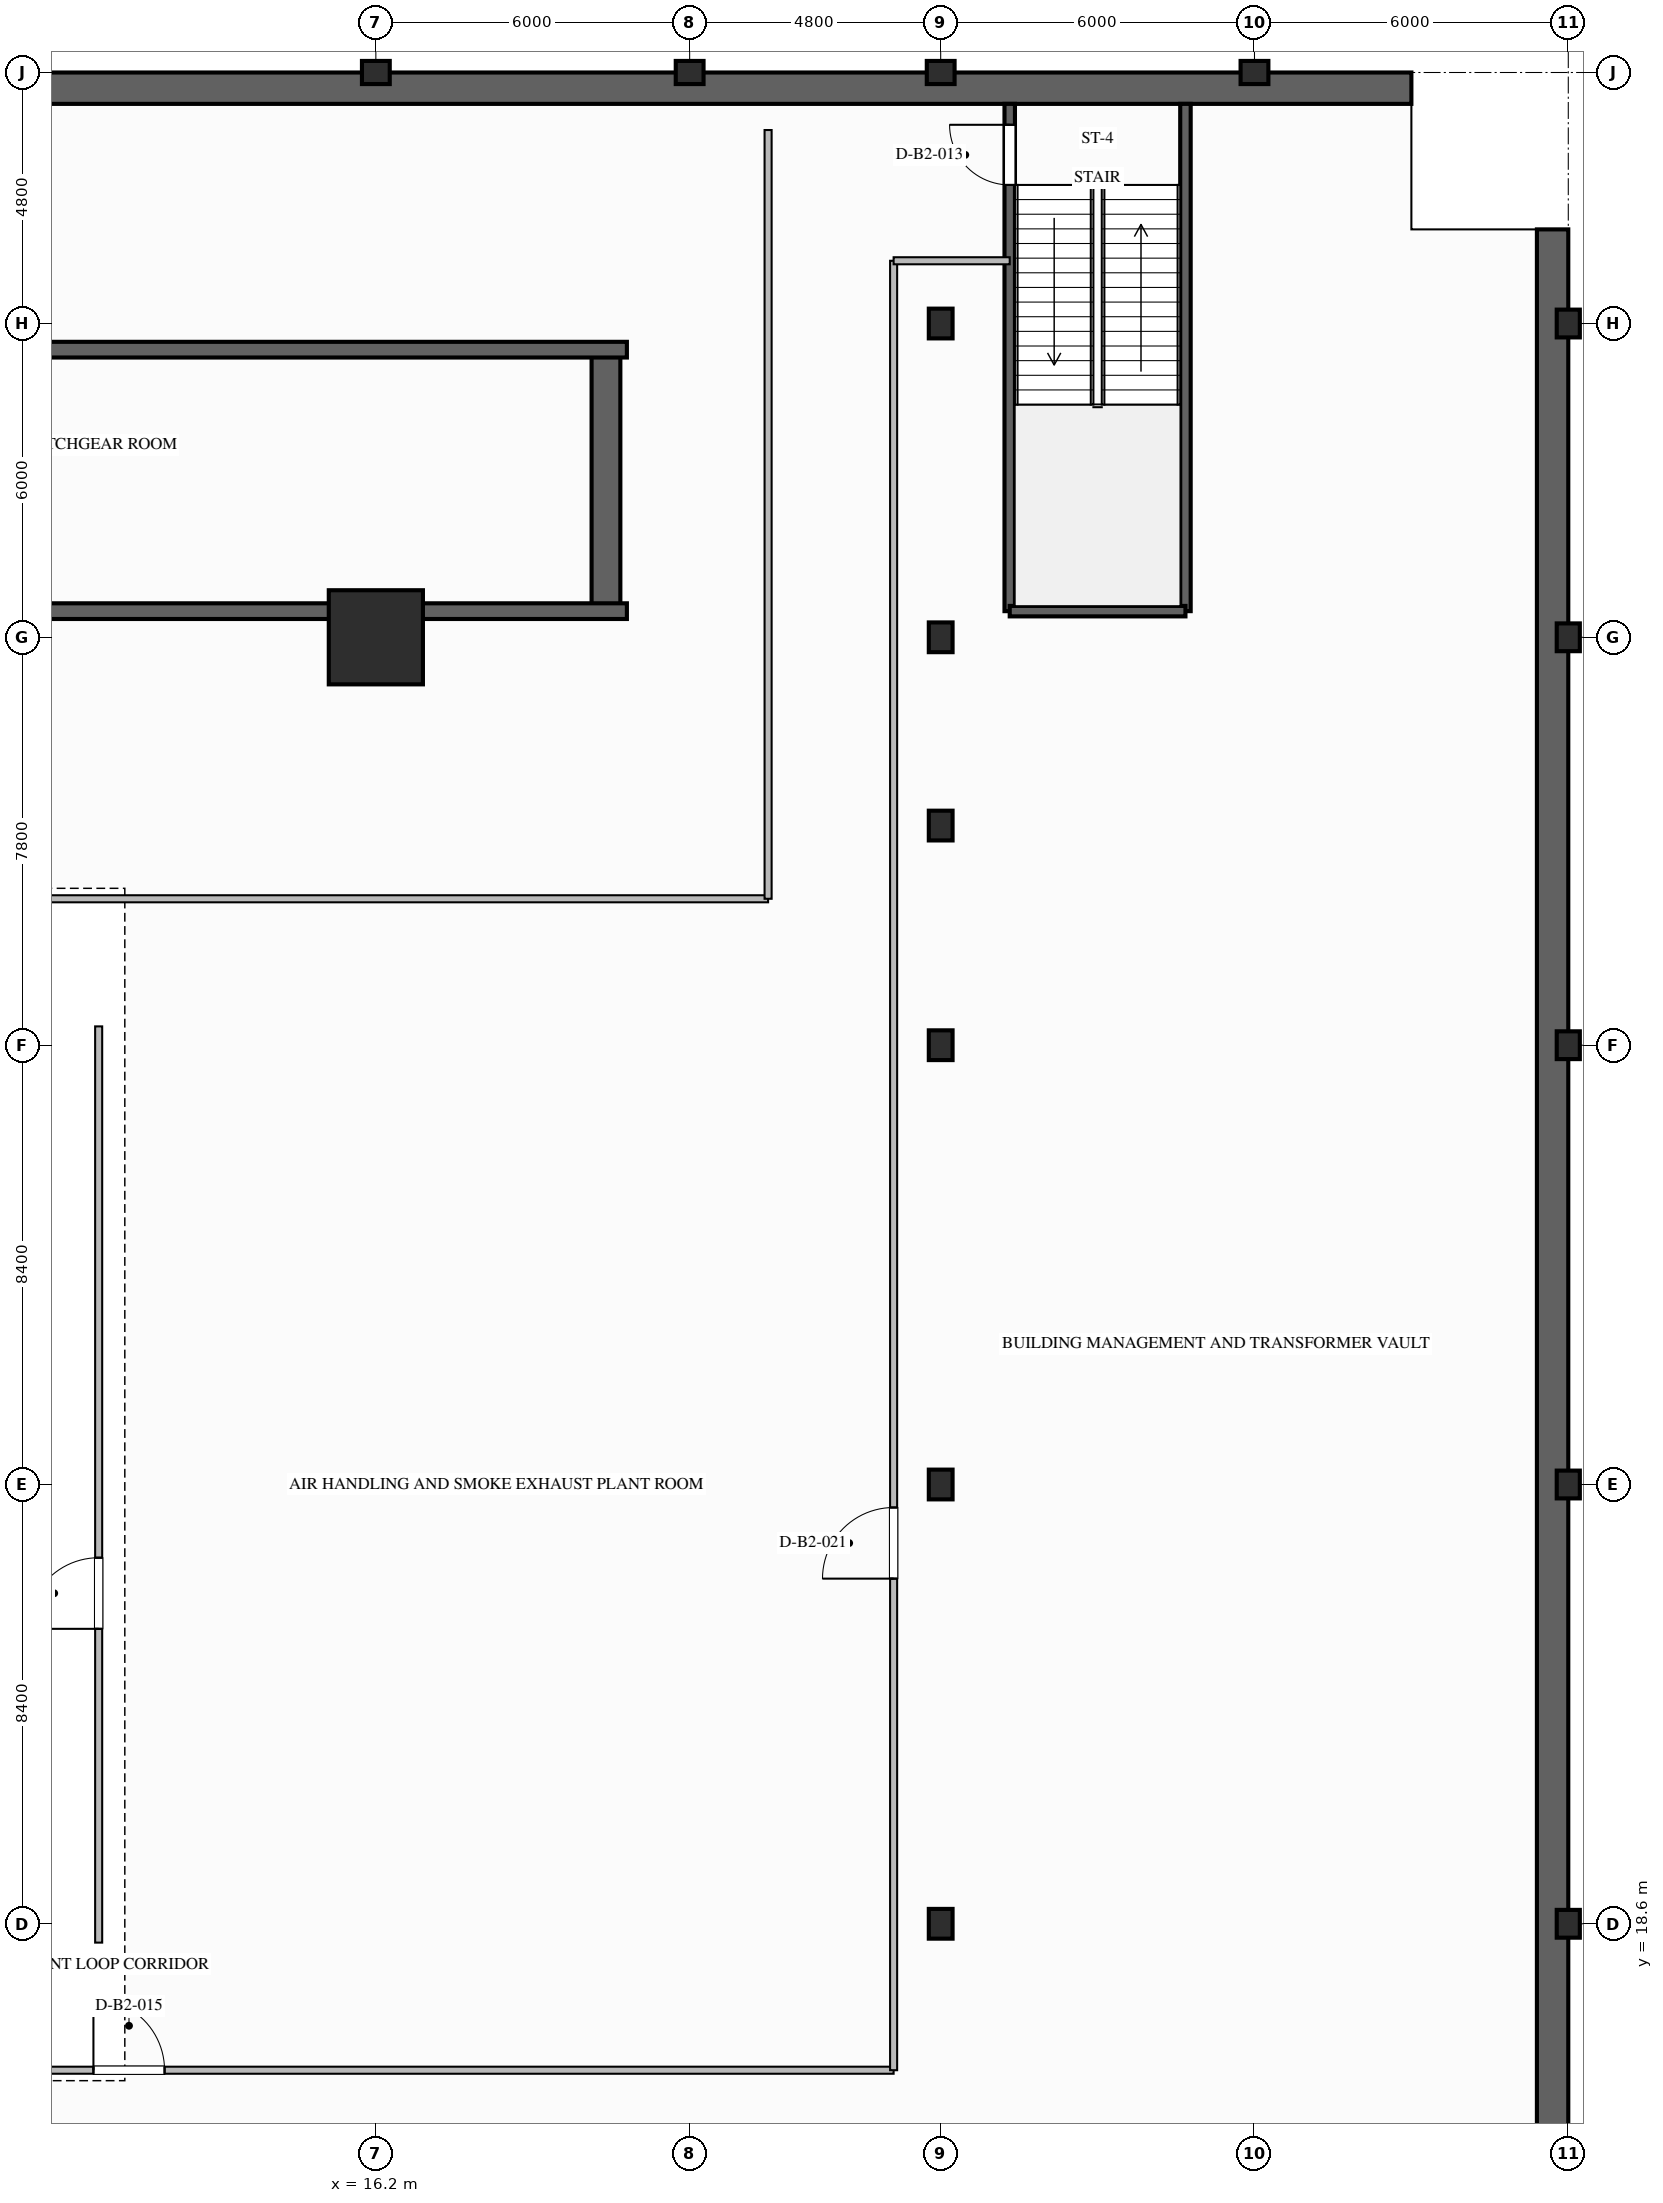
"""IFC4 building model, lengths in metres.
Left out: names, types, materials, properties, quantities, classifications, styles, units other than length and angle.
Written with IfcOpenShell. Run it as: python <this file> out.ifc"""

import sys

from ifc_helpers import new_model, si_unit, direction, frame, frame_2d, origin, origin_2d, place, context, subcontext, project, spatial, rectangle, i_section, extrude, element, fill, save


model = new_model("IFC4")
c1 = context("Model", 3, precision=1e-05, world=origin(), true_north=direction((0.0, 1.0)))
c2 = subcontext(c1, "Body", "Model", "MODEL_VIEW")
j1 = project(units=[si_unit("LENGTHUNIT", "METRE"), si_unit("PLANEANGLEUNIT", "RADIAN")], contexts=[c1])
p1 = place(None, origin())
s1 = spatial("IfcSite", under=j1, at=p1, CompositionType="ELEMENT")
p2 = place(p1, origin())
s2 = spatial("IfcBuilding", under=s1, at=p2, CompositionType="ELEMENT")
p3 = place(p2, frame((0.0, 0.0, -10.8)))
s3 = spatial("IfcBuildingStorey", under=s2, at=p3, CompositionType="ELEMENT", Elevation=-10.8)
p4 = place(p3, frame((-24.0, 53.7, 0.0), z_axis=(0.0, 0.0, 1.0), x_axis=(1.0, 0.0, 0.0)))
e1 = element("IfcWall", 1, at=p4, inside=s3, PredefinedType="USERDEFINED", context=c2, shape_type="SweptSolid", body=[
    extrude(rectangle(XDim=60.0, YDim=0.6, at=frame_2d((30.0, 0.0))), origin(), (0.0, 0.0, 1.0), 5.05),
])
p5 = place(p3, frame((38.7, 51.0, 0.0), z_axis=(0.0, 0.0, 1.0), x_axis=(0.0, -1.0, 0.0)))
e2 = element("IfcWall", 2, at=p5, inside=s3, PredefinedType="USERDEFINED", context=c2, shape_type="SweptSolid", body=[
    extrude(rectangle(XDim=48.0, YDim=0.6, at=frame_2d((24.0, 0.0))), origin(), (0.0, 0.0, 1.0), 5.05),
])
p6 = place(p3, frame((16.2, 43.2, 0.0), z_axis=(0.0, 0.0, 1.0), x_axis=(1.0, 0.0, 0.0)))
e3 = element("IfcColumn", 3, at=p6, inside=s3, PredefinedType="COLUMN", context=c2, shape_type="SweptSolid", body=[
    extrude(rectangle(XDim=1.8, YDim=1.8, at=origin_2d()), origin(), (0.0, 0.0, 1.0), 5.4),
])
for number, where, z_axis, x_axis in (
    (4, (39.0, 18.6, 0.0), (0.0, 0.0, 1.0), (1.0, 0.0, 0.0)),
    (5, (39.0, 27.0, 0.0), (0.0, 0.0, 1.0), (1.0, 0.0, 0.0)),
    (6, (39.0, 35.4, 0.0), (0.0, 0.0, 1.0), (1.0, 0.0, 0.0)),
    (7, (39.0, 43.2, 0.0), (0.0, 0.0, 1.0), (1.0, 0.0, 0.0)),
    (8, (39.0, 49.2, 0.0), (0.0, 0.0, 1.0), (1.0, 0.0, 0.0)),
    (9, (16.2, 54.0, 0.0), (0.0, 0.0, 1.0), (0.0, 1.0, 0.0)),
    (10, (22.2, 54.0, 0.0), (0.0, 0.0, 1.0), (0.0, 1.0, 0.0)),
    (11, (27.0, 54.0, 0.0), (0.0, 0.0, 1.0), (0.0, 1.0, 0.0)),
    (12, (33.0, 54.0, 0.0), (0.0, 0.0, 1.0), (0.0, 1.0, 0.0)),
):
    element("IfcColumn", number, at=place(p3, frame(where, z_axis=z_axis, x_axis=x_axis)), inside=s3, PredefinedType="COLUMN", context=c2, shape_type="SweptSolid", body=[
        extrude(i_section(OverallWidth=0.442, OverallDepth=0.531, WebThickness=0.066, FlangeThickness=0.106, FilletRadius=0.03, at=origin_2d()), origin(), (0.0, 0.0, 1.0), 5.4),
    ])
for number, where, z_axis, x_axis in (
    (13, (27.0, 39.6, 0.0), (0.0, 0.0, 1.0), (1.0, 0.0, 0.0)),
    (14, (27.0, 43.2, 0.0), (0.0, 0.0, 1.0), (1.0, 0.0, 0.0)),
    (15, (27.0, 49.2, 0.0), (0.0, 0.0, 1.0), (1.0, 0.0, 0.0)),
    (16, (27.0, 18.6, 0.0), (0.0, 0.0, 1.0), (1.0, 0.0, 0.0)),
    (17, (27.0, 27.0, 0.0), (0.0, 0.0, 1.0), (1.0, 0.0, 0.0)),
    (18, (27.0, 35.4, 0.0), (0.0, 0.0, 1.0), (1.0, 0.0, 0.0)),
):
    element("IfcColumn", number, at=place(p3, frame(where, z_axis=z_axis, x_axis=x_axis)), inside=s3, PredefinedType="COLUMN", context=c2, shape_type="SweptSolid", body=[
        extrude(i_section(OverallWidth=0.454, OverallDepth=0.569, WebThickness=0.078, FlangeThickness=0.125, FilletRadius=0.03, at=origin_2d()), origin(), (0.0, 0.0, 1.0), 5.4),
    ])
p7 = place(p3, frame((20.6, 43.7, 0.0), z_axis=(0.0, 0.0, 1.0), x_axis=(0.0, 1.0, 0.0)))
e19 = element("IfcWall", 19, at=p7, inside=s3, PredefinedType="USERDEFINED", context=c2, shape_type="SweptSolid", body=[
    extrude(rectangle(XDim=5.0, YDim=0.55, at=frame_2d((2.5, 0.0))), origin(), (0.0, 0.0, 1.0), 5.16),
])
for number, where, z_axis, x_axis in (
    (20, (-26.4, 43.7, 0.0), (0.0, 0.0, 1.0), (1.0, 0.0, 0.0)),
    (21, (-26.4, 48.7, 0.0), (0.0, 0.0, 1.0), (1.0, 0.0, 0.0)),
):
    element("IfcWall", number, at=place(p3, frame(where, z_axis=z_axis, x_axis=x_axis)), inside=s3, PredefinedType="USERDEFINED", context=c2, shape_type="SweptSolid", body=[
        extrude(rectangle(XDim=47.4, YDim=0.3, at=frame_2d((23.7, 0.0))), origin(), (0.0, 0.0, 1.0), 5.4),
    ])
p8 = place(p2, frame((0.0, 0.0, -5.4)))
s4 = spatial("IfcBuildingStorey", under=s2, at=p8, CompositionType="ELEMENT", Elevation=-5.4)
for number, where, z_axis, x_axis in (
    (22, (39.0, 27.0, -5.4), (0.0, 0.0, 1.0), (1.0, 0.0, 0.0)),
    (23, (39.0, 50.55, -5.4), (0.0, 0.0, 1.0), (1.0, 0.0, 0.0)),
):
    element("IfcWall", number, at=place(p8, frame(where, z_axis=z_axis, x_axis=x_axis)), inside=s4, PredefinedType="USERDEFINED", context=c2, shape_type="SweptSolid", body=[
        extrude(rectangle(XDim=5.825, YDim=0.45, at=frame_2d((2.913, 0.0))), origin(), (0.0, 0.0, 1.0), 10.62),
    ])
p9 = place(p8, frame((35.55, 54.0, -5.4), z_axis=(0.0, 0.0, 1.0), x_axis=(0.0, 1.0, 0.0)))
e24 = element("IfcWall", 24, at=p9, inside=s4, PredefinedType="USERDEFINED", context=c2, shape_type="SweptSolid", body=[
    extrude(rectangle(XDim=2.325, YDim=0.45, at=frame_2d((1.163, 0.0))), origin(), (0.0, 0.0, 1.0), 10.62),
])
p10 = place(p3, frame((28.32, 43.7, 0.0), z_axis=(0.0, 0.0, 1.0), x_axis=(0.0, 1.0, 0.0)))
e25 = element("IfcWall", 25, at=p10, inside=s3, PredefinedType="SOLIDWALL", context=c2, shape_type="SweptSolid", body=[
    extrude(rectangle(XDim=9.7, YDim=0.2, at=frame_2d((4.85, 0.0))), origin(), (0.0, 0.0, 1.0), 5.05),
])
p11 = place(p10, frame((8.15, 0.0, 0.0)))
e26 = element("IfcOpeningElement", 26, at=p11, cuts=e25, PredefinedType="OPENING", context=c2, shape_type="SweptSolid", body=[
    extrude(rectangle(XDim=1.15, YDim=2.15, at=frame_2d((0.575, 1.075))), frame((0.0, 0.11, 0.0), z_axis=(0.0, -1.0, 0.0), x_axis=(1.0, 0.0, 0.0)), (0.0, 0.0, 1.0), 0.22),
])
p12 = place(p3, frame((31.68, 53.4, 0.0), z_axis=(0.0, 0.0, 1.0), x_axis=(0.0, -1.0, 0.0)))
e27 = element("IfcWall", 27, at=p12, inside=s3, PredefinedType="SOLIDWALL", context=c2, shape_type="SweptSolid", body=[
    extrude(rectangle(XDim=9.7, YDim=0.2, at=frame_2d((4.85, 0.0))), origin(), (0.0, 0.0, 1.0), 5.05),
])
p13 = place(p3, frame((28.32, 43.7, 0.0), z_axis=(0.0, 0.0, 1.0), x_axis=(1.0, 0.0, 0.0)))
e28 = element("IfcWall", 28, at=p13, inside=s3, PredefinedType="SOLIDWALL", context=c2, shape_type="SweptSolid", body=[
    extrude(rectangle(XDim=3.36, YDim=0.2, at=frame_2d((1.68, 0.0))), origin(), (0.0, 0.0, 1.0), 5.05),
])
p14 = place(p3, frame((-21.2, 15.8, 0.0), z_axis=(0.0, 0.0, 1.0), x_axis=(1.0, 0.0, 0.0)))
e29 = element("IfcWall", 29, at=p14, inside=s3, PredefinedType="PARTITIONING", context=c2, shape_type="SweptSolid", body=[
    extrude(rectangle(XDim=47.3, YDim=0.135, at=frame_2d((23.65, 0.0))), origin(), (0.0, 0.0, 1.0), 5.05),
])
p15 = place(p14, frame((14.0, 0.0, 0.0)))
e30 = element("IfcOpeningElement", 30, at=p15, cuts=e29, PredefinedType="OPENING", context=c2, shape_type="SweptSolid", body=[
    extrude(rectangle(XDim=1.36, YDim=2.2, at=frame_2d((0.68, 1.1))), frame((0.0, 0.077, 0.0), z_axis=(0.0, -1.0, 0.0), x_axis=(1.0, 0.0, 0.0)), (0.0, 0.0, 1.0), 0.155),
])
p16 = place(p14, frame((32.0, 0.0, 0.0)))
e31 = element("IfcOpeningElement", 31, at=p16, cuts=e29, PredefinedType="OPENING", context=c2, shape_type="SweptSolid", body=[
    extrude(rectangle(XDim=1.36, YDim=2.2, at=frame_2d((0.68, 1.1))), frame((0.0, 0.077, 0.0), z_axis=(0.0, -1.0, 0.0), x_axis=(1.0, 0.0, 0.0)), (0.0, 0.0, 1.0), 0.155),
])
p17 = place(p3, frame((-23.6, 38.2, 0.0), z_axis=(0.0, 0.0, 1.0), x_axis=(1.0, 0.0, 0.0)))
e32 = element("IfcWall", 32, at=p17, inside=s3, PredefinedType="PARTITIONING", context=c2, shape_type="SweptSolid", body=[
    extrude(rectangle(XDim=47.3, YDim=0.135, at=frame_2d((23.65, 0.0))), origin(), (0.0, 0.0, 1.0), 5.05),
])
p18 = place(p17, frame((12.0, 0.0, 0.0)))
e33 = element("IfcOpeningElement", 33, at=p18, cuts=e32, PredefinedType="OPENING", context=c2, shape_type="SweptSolid", body=[
    extrude(rectangle(XDim=1.36, YDim=2.2, at=frame_2d((0.68, 1.1))), frame((0.0, 0.077, 0.0), z_axis=(0.0, -1.0, 0.0), x_axis=(1.0, 0.0, 0.0)), (0.0, 0.0, 1.0), 0.155),
])
p19 = place(p17, frame((32.0, 0.0, 0.0)))
e34 = element("IfcOpeningElement", 34, at=p19, cuts=e32, PredefinedType="OPENING", context=c2, shape_type="SweptSolid", body=[
    extrude(rectangle(XDim=1.36, YDim=2.2, at=frame_2d((0.68, 1.1))), frame((0.0, 0.077, 0.0), z_axis=(0.0, -1.0, 0.0), x_axis=(1.0, 0.0, 0.0)), (0.0, 0.0, 1.0), 0.155),
])
p20 = place(p3, frame((10.9, 18.24, 0.0), z_axis=(0.0, 0.0, 1.0), x_axis=(0.0, 1.0, 0.0)))
e35 = element("IfcWall", 35, at=p20, inside=s3, PredefinedType="PARTITIONING", context=c2, shape_type="SweptSolid", body=[
    extrude(rectangle(XDim=17.52, YDim=0.135, at=frame_2d((8.76, 0.0))), origin(), (0.0, 0.0, 1.0), 5.05),
])
p21 = place(p20, frame((6.0, 0.0, 0.0)))
e36 = element("IfcOpeningElement", 36, at=p21, cuts=e35, PredefinedType="OPENING", context=c2, shape_type="SweptSolid", body=[
    extrude(rectangle(XDim=1.36, YDim=2.2, at=frame_2d((0.68, 1.1))), frame((0.0, 0.077, 0.0), z_axis=(0.0, -1.0, 0.0), x_axis=(1.0, 0.0, 0.0)), (0.0, 0.0, 1.0), 0.155),
])
p22 = place(p3, frame((23.7, 38.2, 0.0), z_axis=(0.0, 0.0, 1.0), x_axis=(0.0, 1.0, 0.0)))
e37 = element("IfcWall", 37, at=p22, inside=s3, PredefinedType="PARTITIONING", context=c2, shape_type="SweptSolid", body=[
    extrude(rectangle(XDim=14.7, YDim=0.135, at=frame_2d((7.35, 0.0))), origin(), (0.0, 0.0, 1.0), 5.05),
])
p23 = place(p3, frame((26.1, 15.8, 0.0), z_axis=(0.0, 0.0, 1.0), x_axis=(0.0, 1.0, 0.0)))
e38 = element("IfcWall", 38, at=p23, inside=s3, PredefinedType="PARTITIONING", context=c2, shape_type="SweptSolid", body=[
    extrude(rectangle(XDim=34.6, YDim=0.135, at=frame_2d((17.3, 0.0))), origin(), (0.0, 0.0, 1.0), 5.05),
])
p24 = place(p23, frame((9.4, 0.0, 0.0)))
e39 = element("IfcOpeningElement", 39, at=p24, cuts=e38, PredefinedType="OPENING", context=c2, shape_type="SweptSolid", body=[
    extrude(rectangle(XDim=1.36, YDim=2.2, at=frame_2d((0.68, 1.1))), frame((0.0, 0.077, 0.0), z_axis=(0.0, -1.0, 0.0), x_axis=(1.0, 0.0, 0.0)), (0.0, 0.0, 1.0), 0.155),
])
p25 = place(p3, frame((26.1, 50.4, 0.0), z_axis=(0.0, 0.0, 1.0), x_axis=(1.0, 0.0, 0.0)))
e40 = element("IfcWall", 40, at=p25, inside=s3, PredefinedType="PARTITIONING", context=c2, shape_type="SweptSolid", body=[
    extrude(rectangle(XDim=2.22, YDim=0.135, at=frame_2d((1.11, 0.0))), origin(), (0.0, 0.0, 1.0), 5.05),
])
p26 = place(p11, origin())
e41 = element("IfcDoor", 41, at=p26, inside=s3, OperationType="SINGLE_SWING_RIGHT", PredefinedType="DOOR", context=c2, shape_type="SweptSolid", body=[
    extrude(rectangle(XDim=1.15, YDim=2.15, at=frame_2d((0.575, 1.075))), frame((0.0, 0.025, 0.0), z_axis=(0.0, -1.0, 0.0), x_axis=(1.0, 0.0, 0.0)), (0.0, 0.0, 1.0), 0.05),
])
fill(e26, e41)
p27 = place(p16, origin())
e42 = element("IfcDoor", 42, at=p27, inside=s3, OperationType="SINGLE_SWING_LEFT", PredefinedType="DOOR", context=c2, shape_type="SweptSolid", body=[
    extrude(rectangle(XDim=1.36, YDim=2.2, at=frame_2d((0.68, 1.1))), frame((0.0, 0.025, 0.0), z_axis=(0.0, -1.0, 0.0), x_axis=(1.0, 0.0, 0.0)), (0.0, 0.0, 1.0), 0.05),
])
fill(e31, e42)
p28 = place(p21, origin())
e43 = element("IfcDoor", 43, at=p28, inside=s3, OperationType="SINGLE_SWING_LEFT", PredefinedType="DOOR", context=c2, shape_type="SweptSolid", body=[
    extrude(rectangle(XDim=1.36, YDim=2.2, at=frame_2d((0.68, 1.1))), frame((0.0, 0.025, 0.0), z_axis=(0.0, -1.0, 0.0), x_axis=(1.0, 0.0, 0.0)), (0.0, 0.0, 1.0), 0.05),
])
fill(e36, e43)
p29 = place(p24, origin())
e44 = element("IfcDoor", 44, at=p29, inside=s3, OperationType="SINGLE_SWING_LEFT", PredefinedType="DOOR", context=c2, shape_type="SweptSolid", body=[
    extrude(rectangle(XDim=1.36, YDim=2.2, at=frame_2d((0.68, 1.1))), frame((0.0, 0.025, 0.0), z_axis=(0.0, -1.0, 0.0), x_axis=(1.0, 0.0, 0.0)), (0.0, 0.0, 1.0), 0.05),
])
fill(e39, e44)
save(model, sys.argv[1])
